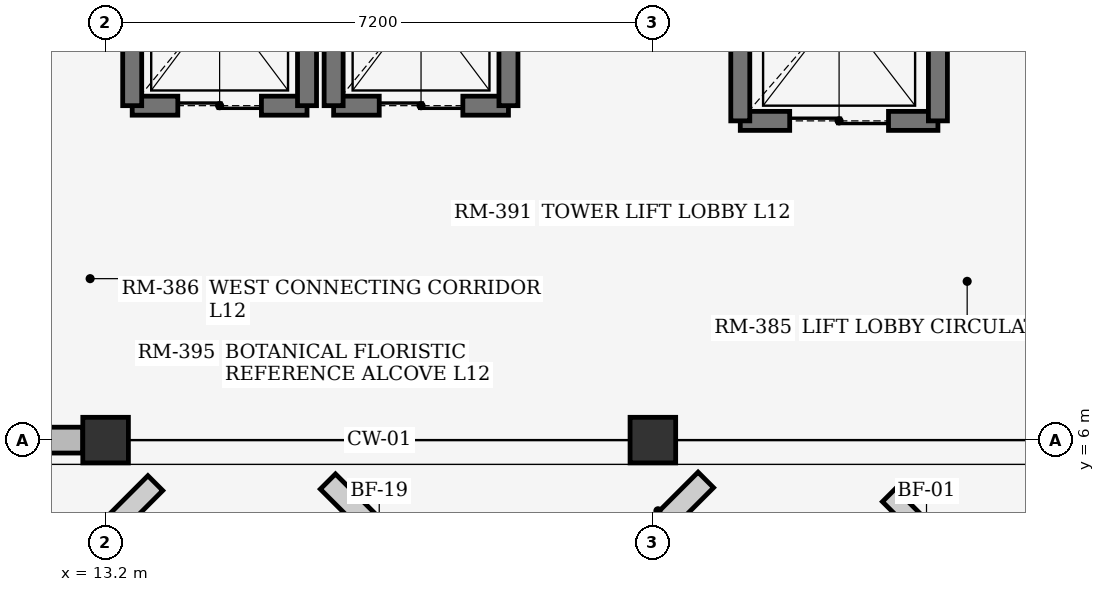
"""IFC4 building model, lengths in metres.
Left out: names, types, materials, properties, quantities, classifications, styles, units other than length and angle.
Written with IfcOpenShell. Run it as: python <this file> out.ifc"""

import sys

from ifc_helpers import new_model, si_unit, direction, frame, frame_2d, origin, origin_2d, place, context, subcontext, project, spatial, rectangle, extrude, element, fill, save


model = new_model("IFC4")
c1 = context("Model", 3, precision=1e-05, world=origin(), true_north=direction((0.0, 1.0)))
c2 = subcontext(c1, "Body", "Model", "MODEL_VIEW")
j1 = project(units=[si_unit("LENGTHUNIT", "METRE"), si_unit("PLANEANGLEUNIT", "RADIAN")], contexts=[c1])
p1 = place(None, origin())
s1 = spatial("IfcSite", under=j1, at=p1, CompositionType="ELEMENT")
p2 = place(p1, origin())
s2 = spatial("IfcBuilding", under=s1, at=p2, CompositionType="ELEMENT")
p3 = place(p2, frame((0.0, 0.0, 48.3)))
s3 = spatial("IfcBuildingStorey", under=s2, at=p3, CompositionType="ELEMENT", Elevation=48.3)
for number, where, z_axis, x_axis in (
    (1, (13.2, 6.0, 0.0), (0.0, 0.0, 1.0), (1.0, 0.0, 0.0)),
    (2, (20.4, 6.0, 0.0), (0.0, 0.0, 1.0), (1.0, 0.0, 0.0)),
):
    element("IfcColumn", number, at=place(p3, frame(where, z_axis=z_axis, x_axis=x_axis)), inside=s3, PredefinedType="COLUMN", context=c2, shape_type="SweptSolid", body=[
        extrude(rectangle(XDim=0.6, YDim=0.6, at=origin_2d()), origin(), (0.0, 0.0, 1.0), 3.68),
    ])
p4 = place(p3, frame((6.3, 6.0, 0.0), z_axis=(0.0, 0.0, 1.0), x_axis=(1.0, 0.0, 0.0)))
e3 = element("IfcWall", 3, at=p4, inside=s3, PredefinedType="STANDARD", context=c2, shape_type="SweptSolid", body=[
    extrude(rectangle(XDim=6.6, YDim=0.34, at=frame_2d((3.3, 0.0))), origin(), (0.0, 0.0, 1.0), 3.26),
])
p5 = place(p4, frame((2.45, 0.0, 0.75)))
e4 = element("IfcOpeningElement", 4, at=p5, cuts=e3, PredefinedType="OPENING", context=c2, shape_type="SweptSolid", body=[
    extrude(rectangle(XDim=1.7, YDim=1.35, at=frame_2d((0.85, 0.675))), frame((0.0, 0.18, 0.0), z_axis=(0.0, -1.0, 0.0), x_axis=(1.0, 0.0, 0.0)), (0.0, 0.0, 1.0), 0.36),
])
p6 = place(p3, frame((13.55, 10.4, 0.0), z_axis=(0.0, 0.0, 1.0), x_axis=(1.0, 0.0, 0.0)))
e5 = element("IfcWall", 5, at=p6, inside=s3, PredefinedType="SHEAR", context=c2, shape_type="SweptSolid", body=[
    extrude(rectangle(XDim=2.3, YDim=0.25, at=frame_2d((1.15, 0.0))), origin(), (0.0, 0.0, 1.0), 3.68),
])
p7 = place(p6, frame((0.6, 0.0, 0.0)))
e6 = element("IfcOpeningElement", 6, at=p7, cuts=e5, PredefinedType="OPENING", context=c2, shape_type="SweptSolid", body=[
    extrude(rectangle(XDim=1.1, YDim=2.2, at=frame_2d((0.55, 1.1))), frame((0.0, 0.135, 0.0), z_axis=(0.0, -1.0, 0.0), x_axis=(1.0, 0.0, 0.0)), (0.0, 0.0, 1.0), 0.27),
])
for number, where, z_axis, x_axis in (
    (7, (13.55, 10.4, 0.0), (0.0, 0.0, 1.0), (0.0, 1.0, 0.0)),
    (8, (15.85, 10.4, 0.0), (0.0, 0.0, 1.0), (0.0, 1.0, 0.0)),
):
    element("IfcWall", number, at=place(p3, frame(where, z_axis=z_axis, x_axis=x_axis)), inside=s3, PredefinedType="SHEAR", context=c2, shape_type="SweptSolid", body=[
        extrude(rectangle(XDim=2.8, YDim=0.25, at=frame_2d((1.4, 0.0))), origin(), (0.0, 0.0, 1.0), 3.68),
    ])
p8 = place(p3, frame((16.2, 10.4, 0.0), z_axis=(0.0, 0.0, 1.0), x_axis=(1.0, 0.0, 0.0)))
e9 = element("IfcWall", 9, at=p8, inside=s3, PredefinedType="SHEAR", context=c2, shape_type="SweptSolid", body=[
    extrude(rectangle(XDim=2.3, YDim=0.25, at=frame_2d((1.15, 0.0))), origin(), (0.0, 0.0, 1.0), 3.68),
])
p9 = place(p8, frame((0.6, 0.0, 0.0)))
e10 = element("IfcOpeningElement", 10, at=p9, cuts=e9, PredefinedType="OPENING", context=c2, shape_type="SweptSolid", body=[
    extrude(rectangle(XDim=1.1, YDim=2.2, at=frame_2d((0.55, 1.1))), frame((0.0, 0.135, 0.0), z_axis=(0.0, -1.0, 0.0), x_axis=(1.0, 0.0, 0.0)), (0.0, 0.0, 1.0), 0.27),
])
for number, where, z_axis, x_axis in (
    (11, (16.2, 10.4, 0.0), (0.0, 0.0, 1.0), (0.0, 1.0, 0.0)),
    (12, (18.5, 10.4, 0.0), (0.0, 0.0, 1.0), (0.0, 1.0, 0.0)),
):
    element("IfcWall", number, at=place(p3, frame(where, z_axis=z_axis, x_axis=x_axis)), inside=s3, PredefinedType="SHEAR", context=c2, shape_type="SweptSolid", body=[
        extrude(rectangle(XDim=2.8, YDim=0.25, at=frame_2d((1.4, 0.0))), origin(), (0.0, 0.0, 1.0), 3.68),
    ])
p10 = place(p3, frame((21.55, 10.2, 0.0), z_axis=(0.0, 0.0, 1.0), x_axis=(1.0, 0.0, 0.0)))
e13 = element("IfcWall", 13, at=p10, inside=s3, PredefinedType="SHEAR", context=c2, shape_type="SweptSolid", body=[
    extrude(rectangle(XDim=2.6, YDim=0.25, at=frame_2d((1.3, 0.0))), origin(), (0.0, 0.0, 1.0), 3.68),
])
p11 = place(p10, frame((0.65, 0.0, 0.0)))
e14 = element("IfcOpeningElement", 14, at=p11, cuts=e13, PredefinedType="OPENING", context=c2, shape_type="SweptSolid", body=[
    extrude(rectangle(XDim=1.3, YDim=2.25, at=frame_2d((0.65, 1.125))), frame((0.0, 0.135, 0.0), z_axis=(0.0, -1.0, 0.0), x_axis=(1.0, 0.0, 0.0)), (0.0, 0.0, 1.0), 0.27),
])
for number, where, z_axis, x_axis in (
    (15, (21.55, 10.2, 0.0), (0.0, 0.0, 1.0), (0.0, 1.0, 0.0)),
    (16, (24.15, 10.2, 0.0), (0.0, 0.0, 1.0), (0.0, 1.0, 0.0)),
):
    element("IfcWall", number, at=place(p3, frame(where, z_axis=z_axis, x_axis=x_axis)), inside=s3, PredefinedType="SHEAR", context=c2, shape_type="SweptSolid", body=[
        extrude(rectangle(XDim=3.0, YDim=0.25, at=frame_2d((1.5, 0.0))), origin(), (0.0, 0.0, 1.0), 3.68),
    ])
p12 = place(p7, origin())
e17 = element("IfcDoor", 17, at=p12, inside=s3, OperationType="DOUBLE_DOOR_SLIDING", PredefinedType="DOOR", context=c2, shape_type="SweptSolid", body=[
    extrude(rectangle(XDim=1.1, YDim=2.2, at=frame_2d((0.55, 1.1))), frame((0.0, 0.025, 0.0), z_axis=(0.0, -1.0, 0.0), x_axis=(1.0, 0.0, 0.0)), (0.0, 0.0, 1.0), 0.05),
])
fill(e6, e17)
p13 = place(p9, origin())
e18 = element("IfcDoor", 18, at=p13, inside=s3, OperationType="DOUBLE_DOOR_SLIDING", PredefinedType="DOOR", context=c2, shape_type="SweptSolid", body=[
    extrude(rectangle(XDim=1.1, YDim=2.2, at=frame_2d((0.55, 1.1))), frame((0.0, 0.025, 0.0), z_axis=(0.0, -1.0, 0.0), x_axis=(1.0, 0.0, 0.0)), (0.0, 0.0, 1.0), 0.05),
])
fill(e10, e18)
p14 = place(p11, origin())
e19 = element("IfcDoor", 19, at=p14, inside=s3, OperationType="DOUBLE_DOOR_SLIDING", PredefinedType="DOOR", context=c2, shape_type="SweptSolid", body=[
    extrude(rectangle(XDim=1.3, YDim=2.25, at=frame_2d((0.65, 1.125))), frame((0.0, 0.025, 0.0), z_axis=(0.0, -1.0, 0.0), x_axis=(1.0, 0.0, 0.0)), (0.0, 0.0, 1.0), 0.05),
])
fill(e14, e19)
save(model, sys.argv[1])
